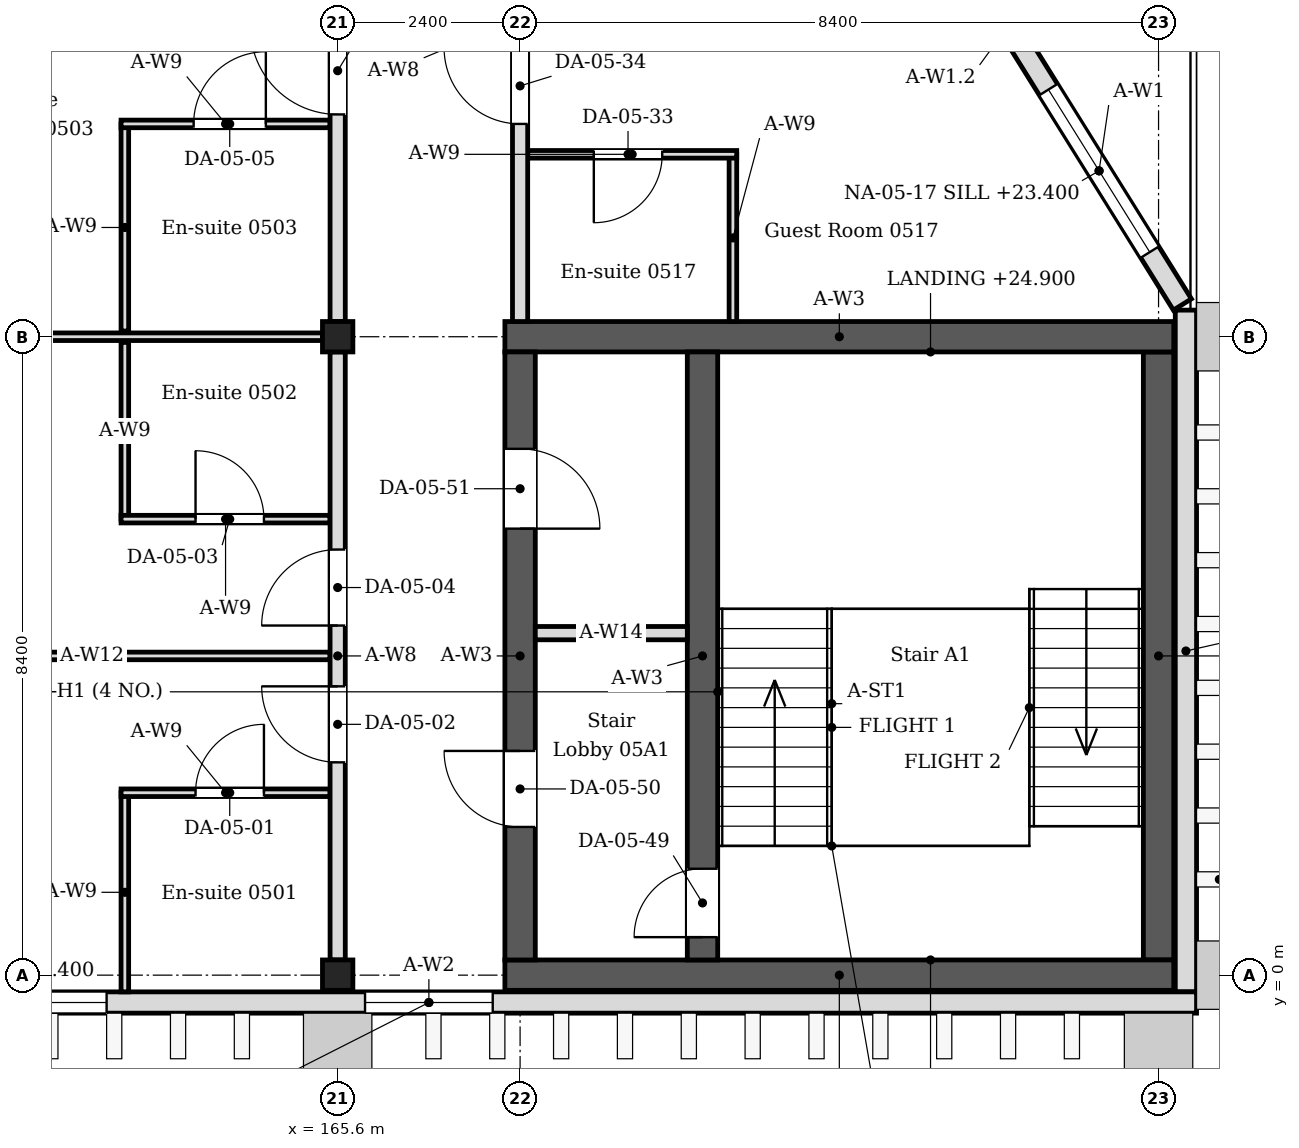
"""IFC4 building model, lengths in metres.
Left out: names, types, materials, properties, quantities, classifications, styles, units other than length and angle.
Written with IfcOpenShell. Run it as: python <this file> out.ifc"""

import sys

from ifc_helpers import new_model, si_unit, direction, frame, frame_2d, origin, origin_2d, place, context, subcontext, project, spatial, rectangle, i_section, extrude, element, fill, save


model = new_model("IFC4")
c1 = context("Model", 3, precision=1e-05, world=origin(), true_north=direction((0.0, 1.0)))
c2 = subcontext(c1, "Body", "Model", "MODEL_VIEW")
j1 = project(units=[si_unit("LENGTHUNIT", "METRE"), si_unit("PLANEANGLEUNIT", "RADIAN")], contexts=[c1])
p1 = place(None, origin())
s1 = spatial("IfcSite", under=j1, at=p1, CompositionType="ELEMENT")
p2 = place(p1, origin())
s2 = spatial("IfcBuilding", under=s1, at=p2, CompositionType="ELEMENT")
p3 = place(p2, frame((0.0, 0.0, 22.8)))
s3 = spatial("IfcBuildingStorey", under=s2, at=p3, CompositionType="ELEMENT", Elevation=22.8)
for number, where, z_axis, x_axis in (
    (1, (165.6, 0.0, 0.0), (0.0, 0.0, 1.0), (1.0, 0.0, 0.0)),
    (2, (165.6, 8.4, 0.0), (0.0, 0.0, 1.0), (1.0, 0.0, 0.0)),
):
    element("IfcColumn", number, at=place(p3, frame(where, z_axis=z_axis, x_axis=x_axis)), inside=s3, PredefinedType="COLUMN", context=c2, shape_type="SweptSolid", body=[
        extrude(i_section(OverallWidth=0.4, OverallDepth=0.4, WebThickness=0.013, FlangeThickness=0.021, FilletRadius=0.022, at=origin_2d()), origin(), (0.0, 0.0, 1.0), 4.2),
    ])
for number, where, z_axis, x_axis in (
    (3, (167.8, 0.0, 0.0), (0.0, 0.0, 1.0), (1.0, 0.0, 0.0)),
    (4, (167.8, 8.4, 0.0), (0.0, 0.0, 1.0), (1.0, 0.0, 0.0)),
):
    element("IfcWall", number, at=place(p3, frame(where, z_axis=z_axis, x_axis=x_axis)), inside=s3, PredefinedType="SOLIDWALL", context=c2, shape_type="SweptSolid", body=[
        extrude(rectangle(XDim=8.8, YDim=0.4, at=frame_2d((4.4, 0.0))), origin(), (0.0, 0.0, 1.0), 4.05),
    ])
p4 = place(p3, frame((168.0, 0.2, 0.0), z_axis=(0.0, 0.0, 1.0), x_axis=(0.0, 1.0, 0.0)))
e5 = element("IfcWall", 5, at=p4, inside=s3, PredefinedType="SOLIDWALL", context=c2, shape_type="SweptSolid", body=[
    extrude(rectangle(XDim=8.0, YDim=0.4, at=frame_2d((4.0, 0.0))), origin(), (0.0, 0.0, 1.0), 4.05),
])
p5 = place(p4, frame((1.75, 0.0, 0.0)))
e6 = element("IfcOpeningElement", 6, at=p5, cuts=e5, PredefinedType="OPENING", context=c2, shape_type="SweptSolid", body=[
    extrude(rectangle(XDim=1.0, YDim=2.1, at=frame_2d((0.5, 1.05))), frame((0.0, 0.21, 0.0), z_axis=(0.0, -1.0, 0.0), x_axis=(1.0, 0.0, 0.0)), (0.0, 0.0, 1.0), 0.42),
])
p6 = place(p4, frame((5.675, 0.0, 0.0)))
e7 = element("IfcOpeningElement", 7, at=p6, cuts=e5, PredefinedType="OPENING", context=c2, shape_type="SweptSolid", body=[
    extrude(rectangle(XDim=1.05, YDim=2.1, at=frame_2d((0.525, 1.05))), frame((0.0, 0.21, 0.0), z_axis=(0.0, -1.0, 0.0), x_axis=(1.0, 0.0, 0.0)), (0.0, 0.0, 1.0), 0.42),
])
p7 = place(p3, frame((176.4, 0.2, 0.0), z_axis=(0.0, 0.0, 1.0), x_axis=(0.0, 1.0, 0.0)))
e8 = element("IfcWall", 8, at=p7, inside=s3, PredefinedType="SOLIDWALL", context=c2, shape_type="SweptSolid", body=[
    extrude(rectangle(XDim=8.0, YDim=0.4, at=frame_2d((4.0, 0.0))), origin(), (0.0, 0.0, 1.0), 4.05),
])
p8 = place(p3, frame((176.76, -0.22, 0.0), z_axis=(0.0, 0.0, 1.0), x_axis=(0.0, 1.0, 0.0)))
e9 = element("IfcWall", 9, at=p8, inside=s3, PredefinedType="SOLIDWALL", context=c2, shape_type="SweptSolid", body=[
    extrude(rectangle(XDim=8.97, YDim=0.28, at=frame_2d((4.485, 0.0))), origin(), (0.0, 0.0, 1.0), 4.05),
])
p9 = place(p3, frame((176.714, 8.824, 0.0), z_axis=(0.0, 0.0, 1.0), x_axis=(-0.529018946142, 0.848610013271, 0.0)))
e10 = element("IfcWall", 10, at=p9, inside=s3, PredefinedType="SOLIDWALL", context=c2, shape_type="SweptSolid", body=[
    extrude(rectangle(XDim=4.144, YDim=0.28, at=frame_2d((2.072, 0.0))), origin(), (0.0, 0.0, 1.0), 4.05),
])
p10 = place(p9, frame((0.812, 0.0, 0.6)))
e11 = element("IfcOpeningElement", 11, at=p10, cuts=e10, PredefinedType="OPENING", context=c2, shape_type="SweptSolid", body=[
    extrude(rectangle(XDim=2.52, YDim=2.4, at=frame_2d((1.26, 1.2))), frame((0.0, 0.15, 0.0), z_axis=(0.0, -1.0, 0.0), x_axis=(1.0, 0.0, 0.0)), (0.0, 0.0, 1.0), 0.3),
])
p11 = place(p3, frame((156.7, -0.36, 0.0), z_axis=(0.0, 0.0, 1.0), x_axis=(1.0, 0.0, 0.0)))
e12 = element("IfcWall", 12, at=p11, inside=s3, PredefinedType="SOLIDWALL", context=c2, shape_type="SweptSolid", body=[
    extrude(rectangle(XDim=20.2, YDim=0.28, at=frame_2d((10.1, 0.0))), origin(), (0.0, 0.0, 1.0), 4.05),
])
p12 = place(p11, frame((9.26, 0.0, 0.6)))
e13 = element("IfcOpeningElement", 13, at=p12, cuts=e12, PredefinedType="OPENING", context=c2, shape_type="SweptSolid", body=[
    extrude(rectangle(XDim=1.68, YDim=2.4, at=frame_2d((0.84, 1.2))), frame((0.0, 0.15, 0.0), z_axis=(0.0, -1.0, 0.0), x_axis=(1.0, 0.0, 0.0)), (0.0, 0.0, 1.0), 0.3),
])
p13 = place(p11, frame((3.34, 0.0, 0.6)))
e14 = element("IfcOpeningElement", 14, at=p13, cuts=e12, PredefinedType="OPENING", context=c2, shape_type="SweptSolid", body=[
    extrude(rectangle(XDim=2.52, YDim=2.4, at=frame_2d((1.26, 1.2))), frame((0.0, 0.15, 0.0), z_axis=(0.0, -1.0, 0.0), x_axis=(1.0, 0.0, 0.0)), (0.0, 0.0, 1.0), 0.3),
])
p14 = place(p3, frame((162.8, -0.22, 0.0), z_axis=(0.0, 0.0, 1.0), x_axis=(0.0, 1.0, 0.0)))
e15 = element("IfcWall", 15, at=p14, inside=s3, PredefinedType="PARTITIONING", context=c2, shape_type="SweptSolid", body=[
    extrude(rectangle(XDim=2.62, YDim=0.1, at=frame_2d((1.31, 0.0))), origin(), (0.0, 0.0, 1.0), 4.05),
])
p15 = place(p3, frame((162.75, 2.4, 0.0), z_axis=(0.0, 0.0, 1.0), x_axis=(1.0, 0.0, 0.0)))
e16 = element("IfcWall", 16, at=p15, inside=s3, PredefinedType="PARTITIONING", context=c2, shape_type="SweptSolid", body=[
    extrude(rectangle(XDim=2.75, YDim=0.1, at=frame_2d((1.375, 0.0))), origin(), (0.0, 0.0, 1.0), 4.05),
])
p16 = place(p15, frame((0.98, 0.0, 0.0)))
e17 = element("IfcOpeningElement", 17, at=p16, cuts=e16, PredefinedType="OPENING", context=c2, shape_type="SweptSolid", body=[
    extrude(rectangle(XDim=0.9, YDim=2.1, at=frame_2d((0.45, 1.05))), frame((0.0, 0.06, 0.0), z_axis=(0.0, -1.0, 0.0), x_axis=(1.0, 0.0, 0.0)), (0.0, 0.0, 1.0), 0.12),
])
p17 = place(p3, frame((162.8, 6.0, 0.0), z_axis=(0.0, 0.0, 1.0), x_axis=(0.0, 1.0, 0.0)))
e18 = element("IfcWall", 18, at=p17, inside=s3, PredefinedType="PARTITIONING", context=c2, shape_type="SweptSolid", body=[
    extrude(rectangle(XDim=2.325, YDim=0.1, at=frame_2d((1.163, 0.0))), origin(), (0.0, 0.0, 1.0), 4.05),
])
p18 = place(p3, frame((162.75, 6.0, 0.0), z_axis=(0.0, 0.0, 1.0), x_axis=(1.0, 0.0, 0.0)))
e19 = element("IfcWall", 19, at=p18, inside=s3, PredefinedType="PARTITIONING", context=c2, shape_type="SweptSolid", body=[
    extrude(rectangle(XDim=2.75, YDim=0.1, at=frame_2d((1.375, 0.0))), origin(), (0.0, 0.0, 1.0), 4.05),
])
p19 = place(p18, frame((0.98, 0.0, 0.0)))
e20 = element("IfcOpeningElement", 20, at=p19, cuts=e19, PredefinedType="OPENING", context=c2, shape_type="SweptSolid", body=[
    extrude(rectangle(XDim=0.9, YDim=2.1, at=frame_2d((0.45, 1.05))), frame((0.0, 0.06, 0.0), z_axis=(0.0, -1.0, 0.0), x_axis=(1.0, 0.0, 0.0)), (0.0, 0.0, 1.0), 0.12),
])
p20 = place(p3, frame((162.8, 8.475, 0.0), z_axis=(0.0, 0.0, 1.0), x_axis=(0.0, 1.0, 0.0)))
e21 = element("IfcWall", 21, at=p20, inside=s3, PredefinedType="PARTITIONING", context=c2, shape_type="SweptSolid", body=[
    extrude(rectangle(XDim=2.725, YDim=0.1, at=frame_2d((1.362, 0.0))), origin(), (0.0, 0.0, 1.0), 4.05),
])
p21 = place(p3, frame((162.75, 11.2, 0.0), z_axis=(0.0, 0.0, 1.0), x_axis=(1.0, 0.0, 0.0)))
e22 = element("IfcWall", 22, at=p21, inside=s3, PredefinedType="PARTITIONING", context=c2, shape_type="SweptSolid", body=[
    extrude(rectangle(XDim=2.75, YDim=0.1, at=frame_2d((1.375, 0.0))), origin(), (0.0, 0.0, 1.0), 4.05),
])
p22 = place(p21, frame((0.955, 0.0, 0.0)))
e23 = element("IfcOpeningElement", 23, at=p22, cuts=e22, PredefinedType="OPENING", context=c2, shape_type="SweptSolid", body=[
    extrude(rectangle(XDim=0.95, YDim=2.1, at=frame_2d((0.475, 1.05))), frame((0.0, 0.06, 0.0), z_axis=(0.0, -1.0, 0.0), x_axis=(1.0, 0.0, 0.0)), (0.0, 0.0, 1.0), 0.12),
])
p23 = place(p3, frame((170.8, 8.6, 0.0), z_axis=(0.0, 0.0, 1.0), x_axis=(0.0, 1.0, 0.0)))
e24 = element("IfcWall", 24, at=p23, inside=s3, PredefinedType="PARTITIONING", context=c2, shape_type="SweptSolid", body=[
    extrude(rectangle(XDim=2.2, YDim=0.1, at=frame_2d((1.1, 0.0))), origin(), (0.0, 0.0, 1.0), 4.05),
])
p24 = place(p3, frame((170.85, 10.8, 0.0), z_axis=(0.0, 0.0, 1.0), x_axis=(-1.0, 0.0, 0.0)))
e25 = element("IfcWall", 25, at=p24, inside=s3, PredefinedType="PARTITIONING", context=c2, shape_type="SweptSolid", body=[
    extrude(rectangle(XDim=2.75, YDim=0.1, at=frame_2d((1.375, 0.0))), origin(), (0.0, 0.0, 1.0), 4.05),
])
p25 = place(p24, frame((0.98, 0.0, 0.0)))
e26 = element("IfcOpeningElement", 26, at=p25, cuts=e25, PredefinedType="OPENING", context=c2, shape_type="SweptSolid", body=[
    extrude(rectangle(XDim=0.9, YDim=2.1, at=frame_2d((0.45, 1.05))), frame((0.0, 0.06, 0.0), z_axis=(0.0, -1.0, 0.0), x_axis=(1.0, 0.0, 0.0)), (0.0, 0.0, 1.0), 0.12),
])
p26 = place(p3, frame((157.4, 8.4, 0.0), z_axis=(0.0, 0.0, 1.0), x_axis=(1.0, 0.0, 0.0)))
e27 = element("IfcWall", 27, at=p26, inside=s3, PredefinedType="PARTITIONING", context=c2, shape_type="SweptSolid", body=[
    extrude(rectangle(XDim=8.0, YDim=0.1, at=frame_2d((4.0, 0.0))), origin(), (0.0, 0.0, 1.0), 3.604),
])
p27 = place(p3, frame((159.24, 4.2, 0.0), z_axis=(0.0, 0.0, 1.0), x_axis=(1.0, 0.0, 0.0)))
e28 = element("IfcWall", 28, at=p27, inside=s3, PredefinedType="PARTITIONING", context=c2, shape_type="SweptSolid", body=[
    extrude(rectangle(XDim=6.26, YDim=0.1, at=frame_2d((3.13, 0.0))), origin(), (0.0, 0.0, 1.0), 3.604),
])
p28 = place(p3, frame((165.6, 0.2, 0.0), z_axis=(0.0, 0.0, 1.0), x_axis=(0.0, 1.0, 0.0)))
e29 = element("IfcWall", 29, at=p28, inside=s3, PredefinedType="PARTITIONING", context=c2, shape_type="SweptSolid", body=[
    extrude(rectangle(XDim=8.0, YDim=0.2, at=frame_2d((4.0, 0.0))), origin(), (0.0, 0.0, 1.0), 3.45),
])
p29 = place(p28, frame((2.6, 0.0, 0.0)))
e30 = element("IfcOpeningElement", 30, at=p29, cuts=e29, PredefinedType="OPENING", context=c2, shape_type="SweptSolid", body=[
    extrude(rectangle(XDim=1.0, YDim=2.4, at=frame_2d((0.5, 1.2))), frame((0.0, 0.11, 0.0), z_axis=(0.0, -1.0, 0.0), x_axis=(1.0, 0.0, 0.0)), (0.0, 0.0, 1.0), 0.22),
])
p30 = place(p28, frame((4.4, 0.0, 0.0)))
e31 = element("IfcOpeningElement", 31, at=p30, cuts=e29, PredefinedType="OPENING", context=c2, shape_type="SweptSolid", body=[
    extrude(rectangle(XDim=1.0, YDim=2.4, at=frame_2d((0.5, 1.2))), frame((0.0, 0.11, 0.0), z_axis=(0.0, -1.0, 0.0), x_axis=(1.0, 0.0, 0.0)), (0.0, 0.0, 1.0), 0.22),
])
p31 = place(p3, frame((165.6, 8.6, 0.0), z_axis=(0.0, 0.0, 1.0), x_axis=(0.0, 1.0, 0.0)))
e32 = element("IfcWall", 32, at=p31, inside=s3, PredefinedType="PARTITIONING", context=c2, shape_type="SweptSolid", body=[
    extrude(rectangle(XDim=8.0, YDim=0.2, at=frame_2d((4.0, 0.0))), origin(), (0.0, 0.0, 1.0), 3.45),
])
p32 = place(p31, frame((2.725, 0.0, 0.0)))
e33 = element("IfcOpeningElement", 33, at=p32, cuts=e32, PredefinedType="OPENING", context=c2, shape_type="SweptSolid", body=[
    extrude(rectangle(XDim=1.15, YDim=2.1, at=frame_2d((0.575, 1.05))), frame((0.0, 0.11, 0.0), z_axis=(0.0, -1.0, 0.0), x_axis=(1.0, 0.0, 0.0)), (0.0, 0.0, 1.0), 0.22),
])
p33 = place(p31, frame((4.4, 0.0, 0.0)))
e34 = element("IfcOpeningElement", 34, at=p33, cuts=e32, PredefinedType="OPENING", context=c2, shape_type="SweptSolid", body=[
    extrude(rectangle(XDim=1.0, YDim=2.4, at=frame_2d((0.5, 1.2))), frame((0.0, 0.11, 0.0), z_axis=(0.0, -1.0, 0.0), x_axis=(1.0, 0.0, 0.0)), (0.0, 0.0, 1.0), 0.22),
])
p34 = place(p3, frame((168.0, 8.6, 0.0), z_axis=(0.0, 0.0, 1.0), x_axis=(0.0, 1.0, 0.0)))
e35 = element("IfcWall", 35, at=p34, inside=s3, PredefinedType="PARTITIONING", context=c2, shape_type="SweptSolid", body=[
    extrude(rectangle(XDim=8.0, YDim=0.2, at=frame_2d((4.0, 0.0))), origin(), (0.0, 0.0, 1.0), 3.45),
])
p35 = place(p34, frame((2.6, 0.0, 0.0)))
e36 = element("IfcOpeningElement", 36, at=p35, cuts=e35, PredefinedType="OPENING", context=c2, shape_type="SweptSolid", body=[
    extrude(rectangle(XDim=1.0, YDim=2.4, at=frame_2d((0.5, 1.2))), frame((0.0, 0.11, 0.0), z_axis=(0.0, -1.0, 0.0), x_axis=(1.0, 0.0, 0.0)), (0.0, 0.0, 1.0), 0.22),
])
p36 = place(p34, frame((4.4, 0.0, 0.0)))
e37 = element("IfcOpeningElement", 37, at=p36, cuts=e35, PredefinedType="OPENING", context=c2, shape_type="SweptSolid", body=[
    extrude(rectangle(XDim=1.0, YDim=2.4, at=frame_2d((0.5, 1.2))), frame((0.0, 0.11, 0.0), z_axis=(0.0, -1.0, 0.0), x_axis=(1.0, 0.0, 0.0)), (0.0, 0.0, 1.0), 0.22),
])
p37 = place(p3, frame((170.4, 0.2, 0.0), z_axis=(0.0, 0.0, 1.0), x_axis=(0.0, 1.0, 0.0)))
e38 = element("IfcWall", 38, at=p37, inside=s3, PredefinedType="SOLIDWALL", context=c2, shape_type="SweptSolid", body=[
    extrude(rectangle(XDim=8.0, YDim=0.4, at=frame_2d((4.0, 0.0))), origin(), (0.0, 0.0, 1.0), 4.05),
])
p38 = place(p37, frame((0.3, 0.0, 0.0)))
e39 = element("IfcOpeningElement", 39, at=p38, cuts=e38, PredefinedType="OPENING", context=c2, shape_type="SweptSolid", body=[
    extrude(rectangle(XDim=0.9, YDim=2.1, at=frame_2d((0.45, 1.05))), frame((0.0, 0.21, 0.0), z_axis=(0.0, -1.0, 0.0), x_axis=(1.0, 0.0, 0.0)), (0.0, 0.0, 1.0), 0.42),
])
p39 = place(p3, frame((168.2, 4.5, 0.0), z_axis=(0.0, 0.0, 1.0), x_axis=(1.0, 0.0, 0.0)))
e40 = element("IfcWall", 40, at=p39, inside=s3, PredefinedType="PARTITIONING", context=c2, shape_type="SweptSolid", body=[
    extrude(rectangle(XDim=2.0, YDim=0.175, at=frame_2d((1.0, 0.0))), origin(), (0.0, 0.0, 1.0), 4.05),
])
p40 = place(p10, origin())
e41 = element("IfcWindow", 41, at=p40, inside=s3, PartitioningType="SINGLE_PANEL", PredefinedType="WINDOW", context=c2, shape_type="SweptSolid", body=[
    extrude(rectangle(XDim=2.52, YDim=2.4, at=frame_2d((1.26, 1.2))), frame((0.0, 0.03, 0.0), z_axis=(0.0, -1.0, 0.0), x_axis=(1.0, 0.0, 0.0)), (0.0, 0.0, 1.0), 0.06),
])
fill(e11, e41)
p41 = place(p12, origin())
e42 = element("IfcWindow", 42, at=p41, inside=s3, PartitioningType="SINGLE_PANEL", PredefinedType="WINDOW", context=c2, shape_type="SweptSolid", body=[
    extrude(rectangle(XDim=1.68, YDim=2.4, at=frame_2d((0.84, 1.2))), frame((0.0, 0.03, 0.0), z_axis=(0.0, -1.0, 0.0), x_axis=(1.0, 0.0, 0.0)), (0.0, 0.0, 1.0), 0.06),
])
fill(e13, e42)
p42 = place(p13, origin())
e43 = element("IfcWindow", 43, at=p42, inside=s3, PartitioningType="SINGLE_PANEL", PredefinedType="WINDOW", context=c2, shape_type="SweptSolid", body=[
    extrude(rectangle(XDim=2.52, YDim=2.4, at=frame_2d((1.26, 1.2))), frame((0.0, 0.03, 0.0), z_axis=(0.0, -1.0, 0.0), x_axis=(1.0, 0.0, 0.0)), (0.0, 0.0, 1.0), 0.06),
])
fill(e14, e43)
p43 = place(p16, origin())
e44 = element("IfcDoor", 44, at=p43, inside=s3, OperationType="SINGLE_SWING_RIGHT", PredefinedType="DOOR", context=c2, shape_type="SweptSolid", body=[
    extrude(rectangle(XDim=0.9, YDim=2.1, at=frame_2d((0.45, 1.05))), frame((0.0, 0.025, 0.0), z_axis=(0.0, -1.0, 0.0), x_axis=(1.0, 0.0, 0.0)), (0.0, 0.0, 1.0), 0.05),
])
fill(e17, e44)
p44 = place(p29, origin())
e45 = element("IfcDoor", 45, at=p44, inside=s3, OperationType="SINGLE_SWING_RIGHT", PredefinedType="DOOR", context=c2, shape_type="SweptSolid", body=[
    extrude(rectangle(XDim=1.0, YDim=2.4, at=frame_2d((0.5, 1.2))), frame((0.0, 0.025, 0.0), z_axis=(0.0, -1.0, 0.0), x_axis=(1.0, 0.0, 0.0)), (0.0, 0.0, 1.0), 0.05),
])
fill(e30, e45)
p45 = place(p19, origin())
e46 = element("IfcDoor", 46, at=p45, inside=s3, OperationType="SINGLE_SWING_LEFT", PredefinedType="DOOR", context=c2, shape_type="SweptSolid", body=[
    extrude(rectangle(XDim=0.9, YDim=2.1, at=frame_2d((0.45, 1.05))), frame((0.0, 0.025, 0.0), z_axis=(0.0, -1.0, 0.0), x_axis=(1.0, 0.0, 0.0)), (0.0, 0.0, 1.0), 0.05),
])
fill(e20, e46)
p46 = place(p30, origin())
e47 = element("IfcDoor", 47, at=p46, inside=s3, OperationType="SINGLE_SWING_LEFT", PredefinedType="DOOR", context=c2, shape_type="SweptSolid", body=[
    extrude(rectangle(XDim=1.0, YDim=2.4, at=frame_2d((0.5, 1.2))), frame((0.0, 0.025, 0.0), z_axis=(0.0, -1.0, 0.0), x_axis=(1.0, 0.0, 0.0)), (0.0, 0.0, 1.0), 0.05),
])
fill(e31, e47)
p47 = place(p22, origin())
e48 = element("IfcDoor", 48, at=p47, inside=s3, OperationType="SINGLE_SWING_RIGHT", PredefinedType="DOOR", context=c2, shape_type="SweptSolid", body=[
    extrude(rectangle(XDim=0.95, YDim=2.1, at=frame_2d((0.475, 1.05))), frame((0.0, 0.025, 0.0), z_axis=(0.0, -1.0, 0.0), x_axis=(1.0, 0.0, 0.0)), (0.0, 0.0, 1.0), 0.05),
])
fill(e23, e48)
p48 = place(p32, origin())
e49 = element("IfcDoor", 49, at=p48, inside=s3, OperationType="SINGLE_SWING_RIGHT", PredefinedType="DOOR", context=c2, shape_type="SweptSolid", body=[
    extrude(rectangle(XDim=1.15, YDim=2.1, at=frame_2d((0.575, 1.05))), frame((0.0, 0.025, 0.0), z_axis=(0.0, -1.0, 0.0), x_axis=(1.0, 0.0, 0.0)), (0.0, 0.0, 1.0), 0.05),
])
fill(e33, e49)
p49 = place(p25, origin())
e50 = element("IfcDoor", 50, at=p49, inside=s3, OperationType="SINGLE_SWING_RIGHT", PredefinedType="DOOR", context=c2, shape_type="SweptSolid", body=[
    extrude(rectangle(XDim=0.9, YDim=2.1, at=frame_2d((0.45, 1.05))), frame((0.0, 0.025, 0.0), z_axis=(0.0, -1.0, 0.0), x_axis=(1.0, 0.0, 0.0)), (0.0, 0.0, 1.0), 0.05),
])
fill(e26, e50)
p50 = place(p35, origin())
e51 = element("IfcDoor", 51, at=p50, inside=s3, OperationType="SINGLE_SWING_RIGHT", PredefinedType="DOOR", context=c2, shape_type="SweptSolid", body=[
    extrude(rectangle(XDim=1.0, YDim=2.4, at=frame_2d((0.5, 1.2))), frame((0.0, 0.025, 0.0), z_axis=(0.0, -1.0, 0.0), x_axis=(1.0, 0.0, 0.0)), (0.0, 0.0, 1.0), 0.05),
])
fill(e36, e51)
p51 = place(p38, origin())
e52 = element("IfcDoor", 52, at=p51, inside=s3, OperationType="SINGLE_SWING_LEFT", PredefinedType="DOOR", context=c2, shape_type="SweptSolid", body=[
    extrude(rectangle(XDim=0.9, YDim=2.1, at=frame_2d((0.45, 1.05))), frame((0.0, 0.025, 0.0), z_axis=(0.0, -1.0, 0.0), x_axis=(1.0, 0.0, 0.0)), (0.0, 0.0, 1.0), 0.05),
])
fill(e39, e52)
p52 = place(p5, origin())
e53 = element("IfcDoor", 53, at=p52, inside=s3, OperationType="SINGLE_SWING_RIGHT", PredefinedType="DOOR", context=c2, shape_type="SweptSolid", body=[
    extrude(rectangle(XDim=1.0, YDim=2.1, at=frame_2d((0.5, 1.05))), frame((0.0, 0.025, 0.0), z_axis=(0.0, -1.0, 0.0), x_axis=(1.0, 0.0, 0.0)), (0.0, 0.0, 1.0), 0.05),
])
fill(e6, e53)
p53 = place(p6, origin())
e54 = element("IfcDoor", 54, at=p53, inside=s3, OperationType="SINGLE_SWING_LEFT", PredefinedType="DOOR", context=c2, shape_type="SweptSolid", body=[
    extrude(rectangle(XDim=1.05, YDim=2.1, at=frame_2d((0.525, 1.05))), frame((0.0, 0.025, 0.0), z_axis=(0.0, -1.0, 0.0), x_axis=(1.0, 0.0, 0.0)), (0.0, 0.0, 1.0), 0.05),
])
fill(e7, e54)
save(model, sys.argv[1])
